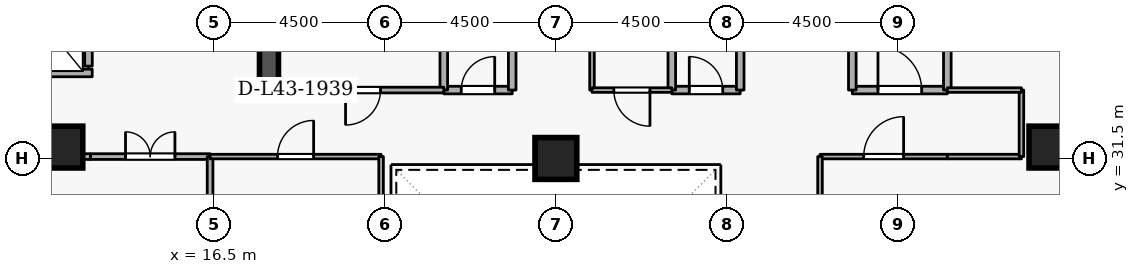
"""IFC4 building model, lengths in metres.
Left out: names, types, materials, properties, quantities, classifications, styles, units other than length and angle.
Written with IfcOpenShell. Run it as: python <this file> out.ifc"""

import sys

from ifc_helpers import new_model, si_unit, direction, frame, frame_2d, origin, origin_2d, place, context, subcontext, project, spatial, rectangle, extrude, element, fill, save


model = new_model("IFC4")
c1 = context("Model", 3, precision=1e-05, world=origin(), true_north=direction((0.0, 1.0)))
c2 = subcontext(c1, "Body", "Model", "MODEL_VIEW")
j1 = project(units=[si_unit("LENGTHUNIT", "METRE"), si_unit("PLANEANGLEUNIT", "RADIAN")], contexts=[c1])
p1 = place(None, origin())
s1 = spatial("IfcSite", under=j1, at=p1, CompositionType="ELEMENT")
p2 = place(p1, origin())
s2 = spatial("IfcBuilding", under=s1, at=p2, CompositionType="ELEMENT")
p3 = place(p2, frame((0.0, 0.0, 163.5)))
s3 = spatial("IfcBuildingStorey", under=s2, at=p3, CompositionType="ELEMENT", Elevation=163.5)
p4 = place(p3, frame((17.95, 33.1, 0.0), z_axis=(0.0, 0.0, 1.0), x_axis=(0.0, 1.0, 0.0)))
e1 = element("IfcWall", 1, at=p4, inside=s3, PredefinedType="SHEAR", context=c2, shape_type="SweptSolid", body=[
    extrude(rectangle(XDim=5.8, YDim=0.5, at=frame_2d((2.9, 0.0))), origin(), (0.0, 0.0, 1.0), 3.6),
])
for number, where, z_axis, x_axis in (
    (2, (12.5, 31.8, 0.0), (0.0, 0.0, 1.0), (1.0, 0.0, 0.0)),
    (3, (38.5, 31.8, 0.0), (0.0, 0.0, 1.0), (1.0, 0.0, 0.0)),
    (4, (25.5, 31.5, 0.0), (0.0, 0.0, 1.0), (1.0, 0.0, 0.0)),
):
    element("IfcColumn", number, at=place(p3, frame(where, z_axis=z_axis, x_axis=x_axis)), inside=s3, PredefinedType="COLUMN", context=c2, shape_type="SweptSolid", body=[
        extrude(rectangle(XDim=1.1, YDim=1.1, at=origin_2d()), origin(), (0.0, 0.0, 1.0), 3.6),
    ])
p5 = place(p3, frame((13.2, 33.93, 0.0), z_axis=(0.0, 0.0, 1.0), x_axis=(0.0, 1.0, 0.0)))
e5 = element("IfcWall", 5, at=p5, inside=s3, PredefinedType="STANDARD", context=c2, shape_type="SweptSolid", body=[
    extrude(rectangle(XDim=1.94, YDim=0.2, at=frame_2d((0.97, 0.0))), origin(), (0.0, 0.0, 1.0), 3.34),
])
p6 = place(p5, frame((0.46, 0.0, 0.0)))
e6 = element("IfcOpeningElement", 6, at=p6, cuts=e5, PredefinedType="OPENING", context=c2, shape_type="SweptSolid", body=[
    extrude(rectangle(XDim=1.02, YDim=2.06, at=frame_2d((0.51, 1.03))), frame((0.0, 0.11, 0.0), z_axis=(0.0, -1.0, 0.0), x_axis=(1.0, 0.0, 0.0)), (0.0, 0.0, 1.0), 0.22),
])
p7 = place(p3, frame((11.002, 33.75, 0.0), z_axis=(0.0, 0.0, 1.0), x_axis=(1.0, 0.0, 0.0)))
e7 = element("IfcWall", 7, at=p7, inside=s3, PredefinedType="STANDARD", context=c2, shape_type="SweptSolid", body=[
    extrude(rectangle(XDim=2.296, YDim=0.2, at=frame_2d((1.148, 0.0))), origin(), (0.0, 0.0, 1.0), 3.34),
])
p8 = place(p3, frame((33.3, 33.3, 0.0), z_axis=(0.0, 0.0, 1.0), x_axis=(1.0, 0.0, 0.0)))
e8 = element("IfcWall", 8, at=p8, inside=s3, PredefinedType="STANDARD", context=c2, shape_type="SweptSolid", body=[
    extrude(rectangle(XDim=2.5, YDim=0.2, at=frame_2d((1.25, 0.0))), origin(), (0.0, 0.0, 1.0), 3.34),
])
p9 = place(p8, frame((0.675, 0.0, 0.0)))
e9 = element("IfcOpeningElement", 9, at=p9, cuts=e8, PredefinedType="OPENING", context=c2, shape_type="SweptSolid", body=[
    extrude(rectangle(XDim=1.15, YDim=2.1, at=frame_2d((0.575, 1.05))), frame((0.0, 0.11, 0.0), z_axis=(0.0, -1.0, 0.0), x_axis=(1.0, 0.0, 0.0)), (0.0, 0.0, 1.0), 0.22),
])
p10 = place(p3, frame((35.8, 33.3, 0.0), z_axis=(0.0, 0.0, 1.0), x_axis=(0.0, 1.0, 0.0)))
e10 = element("IfcWall", 10, at=p10, inside=s3, PredefinedType="STANDARD", context=c2, shape_type="SweptSolid", body=[
    extrude(rectangle(XDim=5.7, YDim=0.2, at=frame_2d((2.85, 0.0))), origin(), (0.0, 0.0, 1.0), 3.34),
])
p11 = place(p3, frame((33.3, 35.6, 0.0), z_axis=(0.0, 0.0, 1.0), x_axis=(0.0, -1.0, 0.0)))
e11 = element("IfcWall", 11, at=p11, inside=s3, PredefinedType="STANDARD", context=c2, shape_type="SweptSolid", body=[
    extrude(rectangle(XDim=2.3, YDim=0.2, at=frame_2d((1.15, 0.0))), origin(), (0.0, 0.0, 1.0), 2.545),
])
p12 = place(p3, frame((22.55, 33.3, 0.0), z_axis=(0.0, 0.0, 1.0), x_axis=(1.0, 0.0, 0.0)))
e12 = element("IfcWall", 12, at=p12, inside=s3, PredefinedType="STANDARD", context=c2, shape_type="SweptSolid", body=[
    extrude(rectangle(XDim=1.8, YDim=0.2, at=frame_2d((0.9, 0.0))), origin(), (0.0, 0.0, 1.0), 3.34),
])
p13 = place(p12, frame((0.46, 0.0, 0.0)))
e13 = element("IfcOpeningElement", 13, at=p13, cuts=e12, PredefinedType="OPENING", context=c2, shape_type="SweptSolid", body=[
    extrude(rectangle(XDim=0.88, YDim=2.04, at=frame_2d((0.44, 1.02))), frame((0.0, 0.11, 0.0), z_axis=(0.0, -1.0, 0.0), x_axis=(1.0, 0.0, 0.0)), (0.0, 0.0, 1.0), 0.22),
])
for number, where, z_axis, x_axis in (
    (14, (24.35, 33.3, 0.0), (0.0, 0.0, 1.0), (0.0, 1.0, 0.0)),
    (15, (22.55, 35.35, 0.0), (0.0, 0.0, 1.0), (0.0, -1.0, 0.0)),
):
    element("IfcWall", number, at=place(p3, frame(where, z_axis=z_axis, x_axis=x_axis)), inside=s3, PredefinedType="STANDARD", context=c2, shape_type="SweptSolid", body=[
        extrude(rectangle(XDim=2.05, YDim=0.2, at=frame_2d((1.025, 0.0))), origin(), (0.0, 0.0, 1.0), 3.34),
    ])
p14 = place(p3, frame((28.55, 33.3, 0.0), z_axis=(0.0, 0.0, 1.0), x_axis=(1.0, 0.0, 0.0)))
e16 = element("IfcWall", 16, at=p14, inside=s3, PredefinedType="STANDARD", context=c2, shape_type="SweptSolid", body=[
    extrude(rectangle(XDim=1.8, YDim=0.2, at=frame_2d((0.9, 0.0))), origin(), (0.0, 0.0, 1.0), 3.34),
])
p15 = place(p14, frame((0.46, 0.0, 0.0)))
e17 = element("IfcOpeningElement", 17, at=p15, cuts=e16, PredefinedType="OPENING", context=c2, shape_type="SweptSolid", body=[
    extrude(rectangle(XDim=0.88, YDim=2.04, at=frame_2d((0.44, 1.02))), frame((0.0, 0.11, 0.0), z_axis=(0.0, -1.0, 0.0), x_axis=(1.0, 0.0, 0.0)), (0.0, 0.0, 1.0), 0.22),
])
for number, where, z_axis, x_axis in (
    (18, (30.35, 33.3, 0.0), (0.0, 0.0, 1.0), (0.0, 1.0, 0.0)),
    (19, (28.55, 35.35, 0.0), (0.0, 0.0, 1.0), (0.0, -1.0, 0.0)),
):
    element("IfcWall", number, at=place(p3, frame(where, z_axis=z_axis, x_axis=x_axis)), inside=s3, PredefinedType="STANDARD", context=c2, shape_type="SweptSolid", body=[
        extrude(rectangle(XDim=2.05, YDim=0.2, at=frame_2d((1.025, 0.0))), origin(), (0.0, 0.0, 1.0), 3.34),
    ])
p16 = place(p3, frame((22.55, 33.3, 0.0), z_axis=(0.0, 0.0, 1.0), x_axis=(-1.0, 0.0, 0.0)))
e20 = element("IfcWall", 20, at=p16, inside=s3, PredefinedType="PARTITIONING", context=c2, shape_type="SweptSolid", body=[
    extrude(rectangle(XDim=4.25, YDim=0.15, at=frame_2d((2.125, 0.0))), origin(), (0.0, 0.0, 1.0), 3.34),
])
p17 = place(p16, frame((1.665, 0.0, 0.0)))
e21 = element("IfcOpeningElement", 21, at=p17, cuts=e20, PredefinedType="OPENING", context=c2, shape_type="SweptSolid", body=[
    extrude(rectangle(XDim=0.92, YDim=2.08, at=frame_2d((0.46, 1.04))), frame((0.0, 0.085, 0.0), z_axis=(0.0, -1.0, 0.0), x_axis=(1.0, 0.0, 0.0)), (0.0, 0.0, 1.0), 0.17),
])
p18 = place(p3, frame((26.45, 33.3, 0.0), z_axis=(0.0, 0.0, 1.0), x_axis=(0.0, 1.0, 0.0)))
e22 = element("IfcWall", 22, at=p18, inside=s3, PredefinedType="PARTITIONING", context=c2, shape_type="SweptSolid", body=[
    extrude(rectangle(XDim=2.05, YDim=0.12, at=frame_2d((1.025, 0.0))), origin(), (0.0, 0.0, 1.0), 3.34),
])
p19 = place(p3, frame((28.55, 33.3, 0.0), z_axis=(0.0, 0.0, 1.0), x_axis=(-1.0, 0.0, 0.0)))
e23 = element("IfcWall", 23, at=p19, inside=s3, PredefinedType="PARTITIONING", context=c2, shape_type="SweptSolid", body=[
    extrude(rectangle(XDim=2.1, YDim=0.12, at=frame_2d((1.05, 0.0))), origin(), (0.0, 0.0, 1.0), 3.34),
])
p20 = place(p19, frame((0.575, 0.0, 0.0)))
e24 = element("IfcOpeningElement", 24, at=p20, cuts=e23, PredefinedType="OPENING", context=c2, shape_type="SweptSolid", body=[
    extrude(rectangle(XDim=0.95, YDim=2.1, at=frame_2d((0.475, 1.05))), frame((0.0, 0.07, 0.0), z_axis=(0.0, -1.0, 0.0), x_axis=(1.0, 0.0, 0.0)), (0.0, 0.0, 1.0), 0.14),
])
p21 = place(p3, frame((13.25, 31.55, 0.0), z_axis=(0.0, 0.0, 1.0), x_axis=(1.0, 0.0, 0.0)))
e25 = element("IfcWall", 25, at=p21, inside=s3, PredefinedType="PARTITIONING", context=c2, shape_type="SweptSolid", body=[
    extrude(rectangle(XDim=3.15, YDim=0.15, at=frame_2d((1.575, 0.0))), origin(), (0.0, 0.0, 1.0), 3.34),
])
p22 = place(p21, frame((0.925, 0.0, 0.0)))
e26 = element("IfcOpeningElement", 26, at=p22, cuts=e25, PredefinedType="OPENING", context=c2, shape_type="SweptSolid", body=[
    extrude(rectangle(XDim=1.3, YDim=2.12, at=frame_2d((0.65, 1.06))), frame((0.0, 0.085, 0.0), z_axis=(0.0, -1.0, 0.0), x_axis=(1.0, 0.0, 0.0)), (0.0, 0.0, 1.0), 0.17),
])
p23 = place(p3, frame((16.4, 31.55, 0.0), z_axis=(0.0, 0.0, 1.0), x_axis=(0.0, -1.0, 0.0)))
e27 = element("IfcWall", 27, at=p23, inside=s3, PredefinedType="PARTITIONING", context=c2, shape_type="SweptSolid", body=[
    extrude(rectangle(XDim=4.55, YDim=0.15, at=frame_2d((2.275, 0.0))), origin(), (0.0, 0.0, 1.0), 3.34),
])
p24 = place(p3, frame((10.9, 31.55, 0.0), z_axis=(0.0, 0.0, 1.0), x_axis=(1.0, 0.0, 0.0)))
e28 = element("IfcWall", 28, at=p24, inside=s3, PredefinedType="PARTITIONING", context=c2, shape_type="SweptSolid", body=[
    extrude(rectangle(XDim=2.35, YDim=0.15, at=frame_2d((1.175, 0.0))), origin(), (0.0, 0.0, 1.0), 3.34),
])
p25 = place(p3, frame((16.4, 31.55, 0.0), z_axis=(0.0, 0.0, 1.0), x_axis=(1.0, 0.0, 0.0)))
e29 = element("IfcWall", 29, at=p25, inside=s3, PredefinedType="PARTITIONING", context=c2, shape_type="SweptSolid", body=[
    extrude(rectangle(XDim=4.5, YDim=0.12, at=frame_2d((2.25, 0.0))), origin(), (0.0, 0.0, 1.0), 3.34),
])
p26 = place(p25, frame((1.775, 0.0, 0.0)))
e30 = element("IfcOpeningElement", 30, at=p26, cuts=e29, PredefinedType="OPENING", context=c2, shape_type="SweptSolid", body=[
    extrude(rectangle(XDim=0.95, YDim=2.1, at=frame_2d((0.475, 1.05))), frame((0.0, 0.07, 0.0), z_axis=(0.0, -1.0, 0.0), x_axis=(1.0, 0.0, 0.0)), (0.0, 0.0, 1.0), 0.14),
])
p27 = place(p3, frame((20.9, 31.55, 0.0), z_axis=(0.0, 0.0, 1.0), x_axis=(0.0, -1.0, 0.0)))
e31 = element("IfcWall", 31, at=p27, inside=s3, PredefinedType="PARTITIONING", context=c2, shape_type="SweptSolid", body=[
    extrude(rectangle(XDim=9.1, YDim=0.12, at=frame_2d((4.55, 0.0))), origin(), (0.0, 0.0, 1.0), 3.34),
])
p28 = place(p3, frame((32.45, 31.55, 0.0), z_axis=(0.0, 0.0, 1.0), x_axis=(1.0, 0.0, 0.0)))
e32 = element("IfcWall", 32, at=p28, inside=s3, PredefinedType="PARTITIONING", context=c2, shape_type="SweptSolid", body=[
    extrude(rectangle(XDim=3.35, YDim=0.12, at=frame_2d((1.675, 0.0))), origin(), (0.0, 0.0, 1.0), 3.34),
])
p29 = place(p28, frame((1.15, 0.0, 0.0)))
e33 = element("IfcOpeningElement", 33, at=p29, cuts=e32, PredefinedType="OPENING", context=c2, shape_type="SweptSolid", body=[
    extrude(rectangle(XDim=1.05, YDim=2.1, at=frame_2d((0.525, 1.05))), frame((0.0, 0.07, 0.0), z_axis=(0.0, -1.0, 0.0), x_axis=(1.0, 0.0, 0.0)), (0.0, 0.0, 1.0), 0.14),
])
p30 = place(p3, frame((35.8, 31.55, 0.0), z_axis=(0.0, 0.0, 1.0), x_axis=(1.0, 0.0, 0.0)))
e34 = element("IfcWall", 34, at=p30, inside=s3, PredefinedType="PARTITIONING", context=c2, shape_type="SweptSolid", body=[
    extrude(rectangle(XDim=1.95, YDim=0.12, at=frame_2d((0.975, 0.0))), origin(), (0.0, 0.0, 1.0), 3.34),
])
p31 = place(p3, frame((37.75, 31.55, 0.0), z_axis=(0.0, 0.0, 1.0), x_axis=(0.0, 1.0, 0.0)))
e35 = element("IfcWall", 35, at=p31, inside=s3, PredefinedType="PARTITIONING", context=c2, shape_type="SweptSolid", body=[
    extrude(rectangle(XDim=1.75, YDim=0.12, at=frame_2d((0.875, 0.0))), origin(), (0.0, 0.0, 1.0), 3.34),
])
p32 = place(p3, frame((37.75, 33.3, 0.0), z_axis=(0.0, 0.0, 1.0), x_axis=(-1.0, 0.0, 0.0)))
e36 = element("IfcWall", 36, at=p32, inside=s3, PredefinedType="PARTITIONING", context=c2, shape_type="SweptSolid", body=[
    extrude(rectangle(XDim=1.95, YDim=0.12, at=frame_2d((0.975, 0.0))), origin(), (0.0, 0.0, 1.0), 3.34),
])
p33 = place(p3, frame((32.45, 29.25, 0.0), z_axis=(0.0, 0.0, 1.0), x_axis=(0.0, 1.0, 0.0)))
e37 = element("IfcWall", 37, at=p33, inside=s3, PredefinedType="PARTITIONING", context=c2, shape_type="SweptSolid", body=[
    extrude(rectangle(XDim=2.3, YDim=0.12, at=frame_2d((1.15, 0.0))), origin(), (0.0, 0.0, 1.0), 3.34),
])
p34 = place(p9, origin())
e38 = element("IfcDoor", 38, at=p34, inside=s3, OperationType="SINGLE_SWING_LEFT", PredefinedType="DOOR", context=c2, shape_type="SweptSolid", body=[
    extrude(rectangle(XDim=1.15, YDim=2.1, at=frame_2d((0.575, 1.05))), frame((0.0, 0.025, 0.0), z_axis=(0.0, -1.0, 0.0), x_axis=(1.0, 0.0, 0.0)), (0.0, 0.0, 1.0), 0.05),
])
fill(e9, e38)
p35 = place(p13, origin())
e39 = element("IfcDoor", 39, at=p35, inside=s3, OperationType="SINGLE_SWING_RIGHT", PredefinedType="DOOR", context=c2, shape_type="SweptSolid", body=[
    extrude(rectangle(XDim=0.88, YDim=2.04, at=frame_2d((0.44, 1.02))), frame((0.0, 0.025, 0.0), z_axis=(0.0, -1.0, 0.0), x_axis=(1.0, 0.0, 0.0)), (0.0, 0.0, 1.0), 0.05),
])
fill(e13, e39)
p36 = place(p15, origin())
e40 = element("IfcDoor", 40, at=p36, inside=s3, OperationType="SINGLE_SWING_LEFT", PredefinedType="DOOR", context=c2, shape_type="SweptSolid", body=[
    extrude(rectangle(XDim=0.88, YDim=2.04, at=frame_2d((0.44, 1.02))), frame((0.0, 0.025, 0.0), z_axis=(0.0, -1.0, 0.0), x_axis=(1.0, 0.0, 0.0)), (0.0, 0.0, 1.0), 0.05),
])
fill(e17, e40)
p37 = place(p17, origin())
e41 = element("IfcDoor", 41, at=p37, inside=s3, OperationType="SINGLE_SWING_RIGHT", PredefinedType="DOOR", context=c2, shape_type="SweptSolid", body=[
    extrude(rectangle(XDim=0.92, YDim=2.08, at=frame_2d((0.46, 1.04))), frame((0.0, 0.025, 0.0), z_axis=(0.0, -1.0, 0.0), x_axis=(1.0, 0.0, 0.0)), (0.0, 0.0, 1.0), 0.05),
])
fill(e21, e41)
p38 = place(p20, origin())
e42 = element("IfcDoor", 42, at=p38, inside=s3, OperationType="SINGLE_SWING_LEFT", PredefinedType="DOOR", context=c2, shape_type="SweptSolid", body=[
    extrude(rectangle(XDim=0.95, YDim=2.1, at=frame_2d((0.475, 1.05))), frame((0.0, 0.025, 0.0), z_axis=(0.0, -1.0, 0.0), x_axis=(1.0, 0.0, 0.0)), (0.0, 0.0, 1.0), 0.05),
])
fill(e24, e42)
p39 = place(p22, origin())
e43 = element("IfcDoor", 43, at=p39, inside=s3, OperationType="DOUBLE_DOOR_SINGLE_SWING", PredefinedType="DOOR", context=c2, shape_type="SweptSolid", body=[
    extrude(rectangle(XDim=1.3, YDim=2.12, at=frame_2d((0.65, 1.06))), frame((0.0, 0.025, 0.0), z_axis=(0.0, -1.0, 0.0), x_axis=(1.0, 0.0, 0.0)), (0.0, 0.0, 1.0), 0.05),
])
fill(e26, e43)
p40 = place(p26, origin())
e44 = element("IfcDoor", 44, at=p40, inside=s3, OperationType="SINGLE_SWING_RIGHT", PredefinedType="DOOR", context=c2, shape_type="SweptSolid", body=[
    extrude(rectangle(XDim=0.95, YDim=2.1, at=frame_2d((0.475, 1.05))), frame((0.0, 0.025, 0.0), z_axis=(0.0, -1.0, 0.0), x_axis=(1.0, 0.0, 0.0)), (0.0, 0.0, 1.0), 0.05),
])
fill(e30, e44)
p41 = place(p29, origin())
e45 = element("IfcDoor", 45, at=p41, inside=s3, OperationType="SINGLE_SWING_RIGHT", PredefinedType="DOOR", context=c2, shape_type="SweptSolid", body=[
    extrude(rectangle(XDim=1.05, YDim=2.1, at=frame_2d((0.525, 1.05))), frame((0.0, 0.025, 0.0), z_axis=(0.0, -1.0, 0.0), x_axis=(1.0, 0.0, 0.0)), (0.0, 0.0, 1.0), 0.05),
])
fill(e33, e45)
save(model, sys.argv[1])
